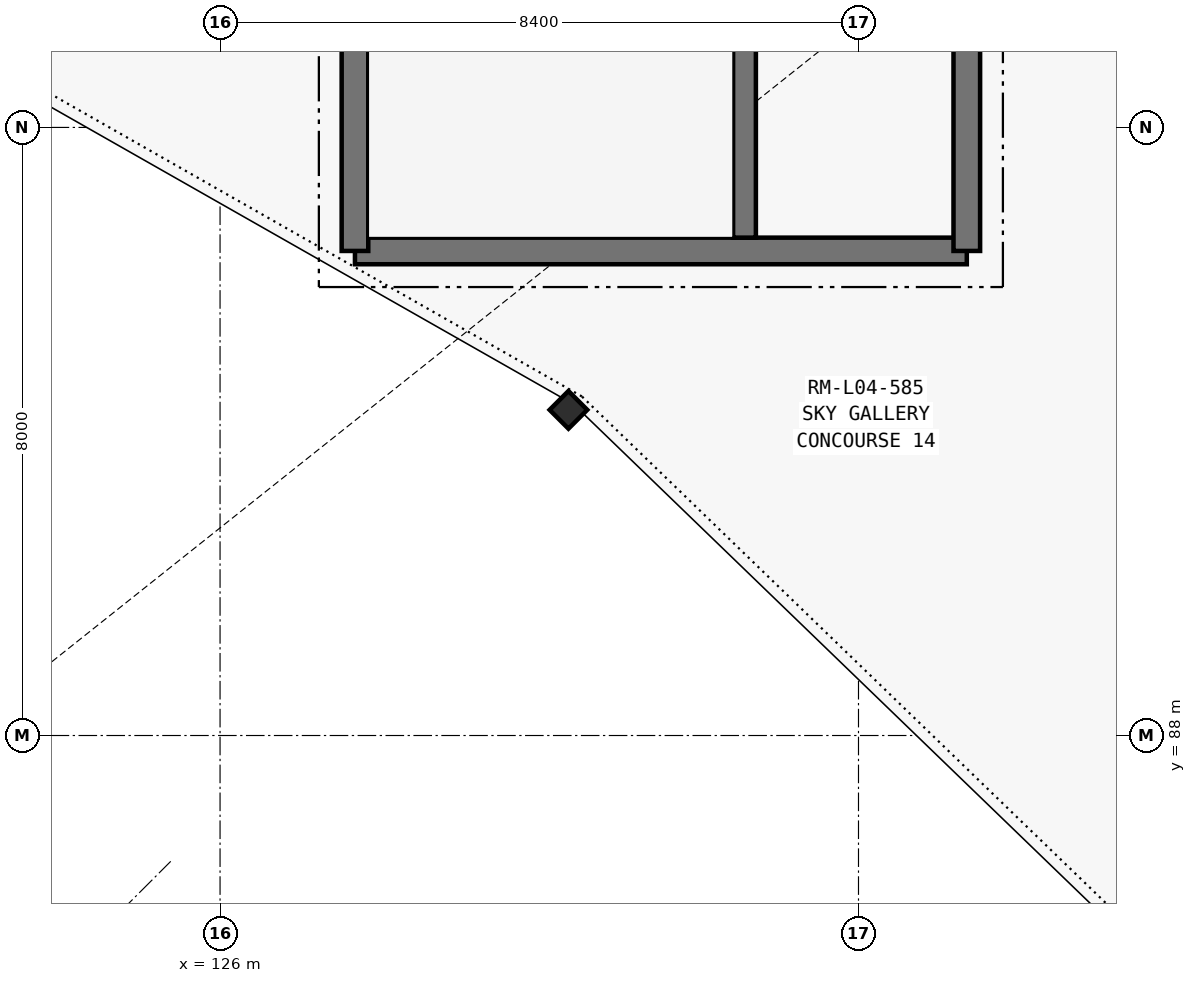
"""IFC4 building model, lengths in metres.
Left out: names, types, materials, properties, quantities, classifications, styles, units other than length and angle.
Written with IfcOpenShell. Run it as: python <this file> out.ifc"""

import sys

from ifc_helpers import new_model, si_unit, direction, frame, frame_2d, origin, origin_2d, place, context, subcontext, project, spatial, rectangle, i_section, extrude, element, save


model = new_model("IFC4")
c1 = context("Model", 3, precision=1e-05, world=origin(), true_north=direction((0.0, 1.0)))
c2 = subcontext(c1, "Body", "Model", "MODEL_VIEW")
j1 = project(units=[si_unit("LENGTHUNIT", "METRE"), si_unit("PLANEANGLEUNIT", "RADIAN")], contexts=[c1])
p1 = place(None, origin())
s1 = spatial("IfcSite", under=j1, at=p1, CompositionType="ELEMENT")
p2 = place(p1, origin())
s2 = spatial("IfcBuilding", under=s1, at=p2, CompositionType="ELEMENT")
p3 = place(p2, frame((0.0, 0.0, 18.9)))
s3 = spatial("IfcBuildingStorey", under=s2, at=p3, CompositionType="ELEMENT", Elevation=18.9)
p4 = place(p3, frame((130.584, 92.284, 0.0), z_axis=(0.0, 0.0, 1.0), x_axis=(0.707106781187, 0.707106781187, 0.0)))
e1 = element("IfcColumn", 1, at=p4, inside=s3, PredefinedType="COLUMN", context=c2, shape_type="SweptSolid", body=[
    extrude(i_section(OverallWidth=0.35, OverallDepth=0.35, WebThickness=0.014, FlangeThickness=0.024, at=origin_2d()), origin(), (0.0, 0.0, 1.0), 4.5),
])
p5 = place(p3, frame((127.775, 94.375, 0.0), z_axis=(0.0, 0.0, 1.0), x_axis=(1.0, 0.0, 0.0)))
e2 = element("IfcWall", 2, at=p5, inside=s3, PredefinedType="SHEAR", context=c2, shape_type="SweptSolid", body=[
    extrude(rectangle(XDim=8.05, YDim=0.35, at=frame_2d((4.025, 0.0))), origin(), (0.0, 0.0, 1.0), 4.5),
])
for number, where, z_axis, x_axis in (
    (3, (127.775, 94.375, 0.0), (0.0, 0.0, 1.0), (0.0, 1.0, 0.0)),
    (4, (135.825, 94.375, 0.0), (0.0, 0.0, 1.0), (0.0, 1.0, 0.0)),
):
    element("IfcWall", number, at=place(p3, frame(where, z_axis=z_axis, x_axis=x_axis)), inside=s3, PredefinedType="SHEAR", context=c2, shape_type="SweptSolid", body=[
        extrude(rectangle(XDim=14.85, YDim=0.35, at=frame_2d((7.425, 0.0))), origin(), (0.0, 0.0, 1.0), 4.5),
    ])
p6 = place(p3, frame((132.9, 94.55, 0.0), z_axis=(0.0, 0.0, 1.0), x_axis=(0.0, 1.0, 0.0)))
e5 = element("IfcWall", 5, at=p6, inside=s3, PredefinedType="SHEAR", context=c2, shape_type="SweptSolid", body=[
    extrude(rectangle(XDim=10.35, YDim=0.3, at=frame_2d((5.175, 0.0))), origin(), (0.0, 0.0, 1.0), 4.5),
])
save(model, sys.argv[1])
